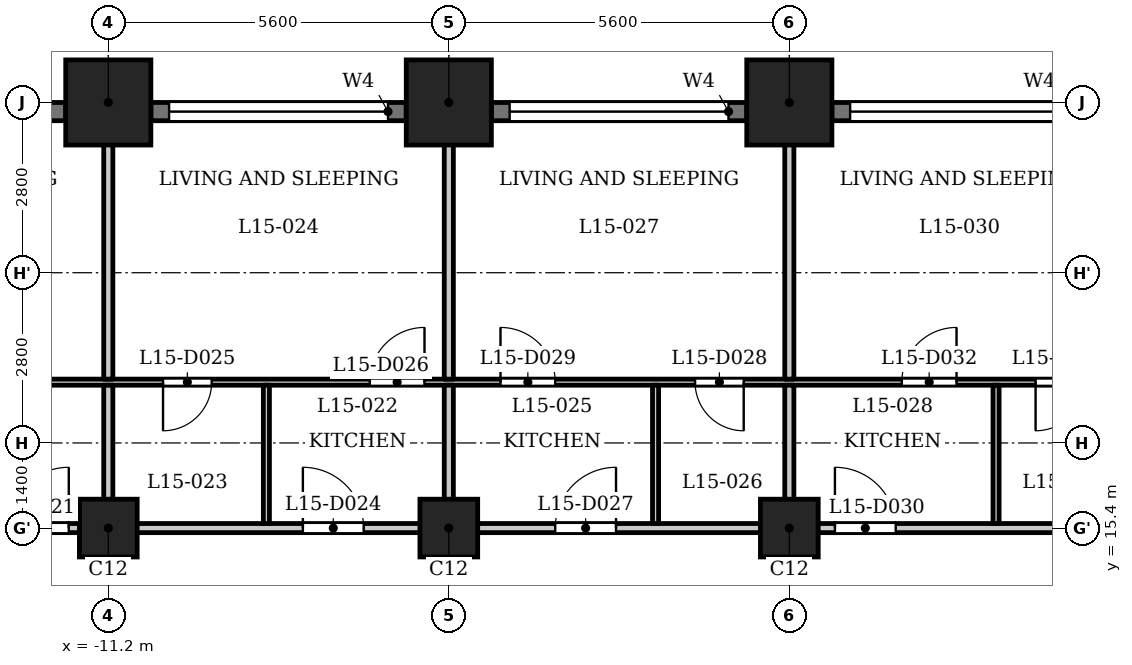
"""IFC4 building model, lengths in metres.
Left out: names, types, materials, properties, quantities, classifications, styles, units other than length and angle.
Written with IfcOpenShell. Run it as: python <this file> out.ifc"""

import sys

from ifc_helpers import new_model, si_unit, direction, frame, frame_2d, origin, origin_2d, place, context, subcontext, project, spatial, rectangle, extrude, element, fill, save


model = new_model("IFC4")
c1 = context("Model", 3, precision=1e-05, world=origin(), true_north=direction((0.0, 1.0)))
c2 = subcontext(c1, "Body", "Model", "MODEL_VIEW")
j1 = project(units=[si_unit("LENGTHUNIT", "METRE"), si_unit("PLANEANGLEUNIT", "RADIAN")], contexts=[c1])
p1 = place(None, origin())
s1 = spatial("IfcSite", under=j1, at=p1, CompositionType="ELEMENT")
p2 = place(p1, origin())
s2 = spatial("IfcBuilding", under=s1, at=p2, CompositionType="ELEMENT")
p3 = place(p2, frame((0.0, 0.0, 62.0)))
s3 = spatial("IfcBuildingStorey", under=s2, at=p3, CompositionType="ELEMENT", Elevation=62.0)
for number, where, z_axis, x_axis in (
    (1, (0.0, 22.4, 0.0), (0.0, 0.0, 1.0), (1.0, 0.0, 0.0)),
    (2, (-5.6, 22.4, 0.0), (0.0, 0.0, 1.0), (1.0, 0.0, 0.0)),
    (3, (-11.2, 22.4, 0.0), (0.0, 0.0, 1.0), (1.0, 0.0, 0.0)),
):
    element("IfcColumn", number, at=place(p3, frame(where, z_axis=z_axis, x_axis=x_axis)), inside=s3, PredefinedType="COLUMN", context=c2, shape_type="SweptSolid", body=[
        extrude(rectangle(XDim=1.4, YDim=1.4, at=origin_2d()), origin(), (0.0, 0.0, 1.0), 3.5),
    ])
for number, where, z_axis, x_axis in (
    (4, (-11.2, 15.4, 0.0), (0.0, 0.0, 1.0), (1.0, 0.0, 0.0)),
    (5, (-5.6, 15.4, 0.0), (0.0, 0.0, 1.0), (1.0, 0.0, 0.0)),
    (6, (0.0, 15.4, 0.0), (0.0, 0.0, 1.0), (1.0, 0.0, 0.0)),
):
    element("IfcColumn", number, at=place(p3, frame(where, z_axis=z_axis, x_axis=x_axis)), inside=s3, PredefinedType="COLUMN", context=c2, shape_type="SweptSolid", body=[
        extrude(rectangle(XDim=0.95, YDim=0.95, at=origin_2d()), origin(), (0.0, 0.0, 1.0), 3.5),
    ])
p4 = place(p3, frame((4.9, 22.25, 0.0), z_axis=(0.0, 0.0, 1.0), x_axis=(-1.0, 0.0, 0.0)))
e7 = element("IfcWall", 7, at=p4, inside=s3, PredefinedType="SOLIDWALL", context=c2, shape_type="SweptSolid", body=[
    extrude(rectangle(XDim=4.2, YDim=0.3, at=frame_2d((2.1, 0.0))), origin(), (0.0, 0.0, 1.0), 2.35),
])
p5 = place(p4, frame((0.3, 0.0, 1.2)))
e8 = element("IfcOpeningElement", 8, at=p5, cuts=e7, PredefinedType="OPENING", context=c2, shape_type="SweptSolid", body=[
    extrude(rectangle(XDim=3.6, YDim=0.95, at=frame_2d((1.8, 0.475))), frame((0.0, 0.16, 0.0), z_axis=(0.0, -1.0, 0.0), x_axis=(1.0, 0.0, 0.0)), (0.0, 0.0, 1.0), 0.32),
])
p6 = place(p3, frame((-0.7, 22.25, 0.0), z_axis=(0.0, 0.0, 1.0), x_axis=(-1.0, 0.0, 0.0)))
e9 = element("IfcWall", 9, at=p6, inside=s3, PredefinedType="SOLIDWALL", context=c2, shape_type="SweptSolid", body=[
    extrude(rectangle(XDim=4.2, YDim=0.3, at=frame_2d((2.1, 0.0))), origin(), (0.0, 0.0, 1.0), 2.35),
])
p7 = place(p6, frame((0.3, 0.0, 1.2)))
e10 = element("IfcOpeningElement", 10, at=p7, cuts=e9, PredefinedType="OPENING", context=c2, shape_type="SweptSolid", body=[
    extrude(rectangle(XDim=3.6, YDim=0.95, at=frame_2d((1.8, 0.475))), frame((0.0, 0.16, 0.0), z_axis=(0.0, -1.0, 0.0), x_axis=(1.0, 0.0, 0.0)), (0.0, 0.0, 1.0), 0.32),
])
p8 = place(p3, frame((-6.3, 22.25, 0.0), z_axis=(0.0, 0.0, 1.0), x_axis=(-1.0, 0.0, 0.0)))
e11 = element("IfcWall", 11, at=p8, inside=s3, PredefinedType="SOLIDWALL", context=c2, shape_type="SweptSolid", body=[
    extrude(rectangle(XDim=4.2, YDim=0.3, at=frame_2d((2.1, 0.0))), origin(), (0.0, 0.0, 1.0), 2.35),
])
p9 = place(p8, frame((0.3, 0.0, 1.2)))
e12 = element("IfcOpeningElement", 12, at=p9, cuts=e11, PredefinedType="OPENING", context=c2, shape_type="SweptSolid", body=[
    extrude(rectangle(XDim=3.6, YDim=0.95, at=frame_2d((1.8, 0.475))), frame((0.0, 0.16, 0.0), z_axis=(0.0, -1.0, 0.0), x_axis=(1.0, 0.0, 0.0)), (0.0, 0.0, 1.0), 0.32),
])
p10 = place(p3, frame((-11.9, 22.25, 0.0), z_axis=(0.0, 0.0, 1.0), x_axis=(-1.0, 0.0, 0.0)))
e13 = element("IfcWall", 13, at=p10, inside=s3, PredefinedType="SOLIDWALL", context=c2, shape_type="SweptSolid", body=[
    extrude(rectangle(XDim=4.2, YDim=0.3, at=frame_2d((2.1, 0.0))), origin(), (0.0, 0.0, 1.0), 2.35),
])
p11 = place(p10, frame((0.3, 0.0, 1.2)))
e14 = element("IfcOpeningElement", 14, at=p11, cuts=e13, PredefinedType="OPENING", context=c2, shape_type="SweptSolid", body=[
    extrude(rectangle(XDim=3.6, YDim=0.95, at=frame_2d((1.8, 0.475))), frame((0.0, 0.16, 0.0), z_axis=(0.0, -1.0, 0.0), x_axis=(1.0, 0.0, 0.0)), (0.0, 0.0, 1.0), 0.32),
])
p12 = place(p3, frame((-27.484, 15.4, 0.0), z_axis=(0.0, 0.0, 1.0), x_axis=(1.0, 0.0, 0.0)))
e15 = element("IfcWall", 15, at=p12, inside=s3, PredefinedType="PARTITIONING", context=c2, shape_type="SweptSolid", body=[
    extrude(rectangle(XDim=54.968, YDim=0.15, at=frame_2d((27.484, 0.0))), origin(), (0.0, 0.0, 1.0), 3.2),
])
p13 = place(p12, frame((8.784, 0.0, 0.0)))
e16 = element("IfcOpeningElement", 16, at=p13, cuts=e15, PredefinedType="OPENING", context=c2, shape_type="SweptSolid", body=[
    extrude(rectangle(XDim=1.0, YDim=2.1, at=frame_2d((0.5, 1.05))), frame((0.0, 0.085, 0.0), z_axis=(0.0, -1.0, 0.0), x_axis=(1.0, 0.0, 0.0)), (0.0, 0.0, 1.0), 0.17),
])
p14 = place(p12, frame((14.634, 0.0, 0.0)))
e17 = element("IfcOpeningElement", 17, at=p14, cuts=e15, PredefinedType="OPENING", context=c2, shape_type="SweptSolid", body=[
    extrude(rectangle(XDim=1.0, YDim=2.1, at=frame_2d((0.5, 1.05))), frame((0.0, 0.085, 0.0), z_axis=(0.0, -1.0, 0.0), x_axis=(1.0, 0.0, 0.0)), (0.0, 0.0, 1.0), 0.17),
])
p15 = place(p12, frame((19.484, 0.0, 0.0)))
e18 = element("IfcOpeningElement", 18, at=p15, cuts=e15, PredefinedType="OPENING", context=c2, shape_type="SweptSolid", body=[
    extrude(rectangle(XDim=1.0, YDim=2.1, at=frame_2d((0.5, 1.05))), frame((0.0, 0.085, 0.0), z_axis=(0.0, -1.0, 0.0), x_axis=(1.0, 0.0, 0.0)), (0.0, 0.0, 1.0), 0.17),
])
p16 = place(p12, frame((23.634, 0.0, 0.0)))
e19 = element("IfcOpeningElement", 19, at=p16, cuts=e15, PredefinedType="OPENING", context=c2, shape_type="SweptSolid", body=[
    extrude(rectangle(XDim=1.0, YDim=2.1, at=frame_2d((0.5, 1.05))), frame((0.0, 0.085, 0.0), z_axis=(0.0, -1.0, 0.0), x_axis=(1.0, 0.0, 0.0)), (0.0, 0.0, 1.0), 0.17),
])
p17 = place(p12, frame((28.234, 0.0, 0.0)))
e20 = element("IfcOpeningElement", 20, at=p17, cuts=e15, PredefinedType="OPENING", context=c2, shape_type="SweptSolid", body=[
    extrude(rectangle(XDim=1.0, YDim=2.1, at=frame_2d((0.5, 1.05))), frame((0.0, 0.085, 0.0), z_axis=(0.0, -1.0, 0.0), x_axis=(1.0, 0.0, 0.0)), (0.0, 0.0, 1.0), 0.17),
])
p18 = place(p12, frame((33.784, 0.0, 0.0)))
e21 = element("IfcOpeningElement", 21, at=p18, cuts=e15, PredefinedType="OPENING", context=c2, shape_type="SweptSolid", body=[
    extrude(rectangle(XDim=1.0, YDim=2.1, at=frame_2d((0.5, 1.05))), frame((0.0, 0.085, 0.0), z_axis=(0.0, -1.0, 0.0), x_axis=(1.0, 0.0, 0.0)), (0.0, 0.0, 1.0), 0.17),
])
p19 = place(p12, frame((39.534, 0.0, 0.0)))
e22 = element("IfcOpeningElement", 22, at=p19, cuts=e15, PredefinedType="OPENING", context=c2, shape_type="SweptSolid", body=[
    extrude(rectangle(XDim=1.0, YDim=2.1, at=frame_2d((0.5, 1.05))), frame((0.0, 0.085, 0.0), z_axis=(0.0, -1.0, 0.0), x_axis=(1.0, 0.0, 0.0)), (0.0, 0.0, 1.0), 0.17),
])
p20 = place(p12, frame((48.234, 0.0, 0.0)))
e23 = element("IfcOpeningElement", 23, at=p20, cuts=e15, PredefinedType="OPENING", context=c2, shape_type="SweptSolid", body=[
    extrude(rectangle(XDim=1.0, YDim=2.1, at=frame_2d((0.5, 1.05))), frame((0.0, 0.085, 0.0), z_axis=(0.0, -1.0, 0.0), x_axis=(1.0, 0.0, 0.0)), (0.0, 0.0, 1.0), 0.17),
])
p21 = place(p3, frame((-26.64, 17.8, 0.0), z_axis=(0.0, 0.0, 1.0), x_axis=(1.0, 0.0, 0.0)))
e24 = element("IfcWall", 24, at=p21, inside=s3, PredefinedType="PARTITIONING", context=c2, shape_type="SweptSolid", body=[
    extrude(rectangle(XDim=53.034, YDim=0.1, at=frame_2d((26.517, 0.0))), origin(), (0.0, 0.0, 1.0), 3.2),
])
p22 = place(p21, frame((2.872, 0.0, 0.0)))
e25 = element("IfcOpeningElement", 25, at=p22, cuts=e24, PredefinedType="OPENING", context=c2, shape_type="SweptSolid", body=[
    extrude(rectangle(XDim=0.8, YDim=2.1, at=frame_2d((0.4, 1.05))), frame((0.0, 0.06, 0.0), z_axis=(0.0, -1.0, 0.0), x_axis=(1.0, 0.0, 0.0)), (0.0, 0.0, 1.0), 0.12),
])
p23 = place(p21, frame((7.04, 0.0, 0.0)))
e26 = element("IfcOpeningElement", 26, at=p23, cuts=e24, PredefinedType="OPENING", context=c2, shape_type="SweptSolid", body=[
    extrude(rectangle(XDim=0.9, YDim=2.1, at=frame_2d((0.45, 1.05))), frame((0.0, 0.06, 0.0), z_axis=(0.0, -1.0, 0.0), x_axis=(1.0, 0.0, 0.0)), (0.0, 0.0, 1.0), 0.12),
])
p24 = place(p21, frame((10.74, 0.0, 0.0)))
e27 = element("IfcOpeningElement", 27, at=p24, cuts=e24, PredefinedType="OPENING", context=c2, shape_type="SweptSolid", body=[
    extrude(rectangle(XDim=0.8, YDim=2.1, at=frame_2d((0.4, 1.05))), frame((0.0, 0.06, 0.0), z_axis=(0.0, -1.0, 0.0), x_axis=(1.0, 0.0, 0.0)), (0.0, 0.0, 1.0), 0.12),
])
p25 = place(p21, frame((12.89, 0.0, 0.0)))
e28 = element("IfcOpeningElement", 28, at=p25, cuts=e24, PredefinedType="OPENING", context=c2, shape_type="SweptSolid", body=[
    extrude(rectangle(XDim=0.9, YDim=2.1, at=frame_2d((0.45, 1.05))), frame((0.0, 0.06, 0.0), z_axis=(0.0, -1.0, 0.0), x_axis=(1.0, 0.0, 0.0)), (0.0, 0.0, 1.0), 0.12),
])
p26 = place(p21, frame((16.34, 0.0, 0.0)))
e29 = element("IfcOpeningElement", 29, at=p26, cuts=e24, PredefinedType="OPENING", context=c2, shape_type="SweptSolid", body=[
    extrude(rectangle(XDim=0.8, YDim=2.1, at=frame_2d((0.4, 1.05))), frame((0.0, 0.06, 0.0), z_axis=(0.0, -1.0, 0.0), x_axis=(1.0, 0.0, 0.0)), (0.0, 0.0, 1.0), 0.12),
])
p27 = place(p21, frame((19.74, 0.0, 0.0)))
e30 = element("IfcOpeningElement", 30, at=p27, cuts=e24, PredefinedType="OPENING", context=c2, shape_type="SweptSolid", body=[
    extrude(rectangle(XDim=0.9, YDim=2.1, at=frame_2d((0.45, 1.05))), frame((0.0, 0.06, 0.0), z_axis=(0.0, -1.0, 0.0), x_axis=(1.0, 0.0, 0.0)), (0.0, 0.0, 1.0), 0.12),
])
p28 = place(p21, frame((25.09, 0.0, 0.0)))
e31 = element("IfcOpeningElement", 31, at=p28, cuts=e24, PredefinedType="OPENING", context=c2, shape_type="SweptSolid", body=[
    extrude(rectangle(XDim=0.8, YDim=2.1, at=frame_2d((0.4, 1.05))), frame((0.0, 0.06, 0.0), z_axis=(0.0, -1.0, 0.0), x_axis=(1.0, 0.0, 0.0)), (0.0, 0.0, 1.0), 0.12),
])
p29 = place(p21, frame((21.89, 0.0, 0.0)))
e32 = element("IfcOpeningElement", 32, at=p29, cuts=e24, PredefinedType="OPENING", context=c2, shape_type="SweptSolid", body=[
    extrude(rectangle(XDim=0.9, YDim=2.1, at=frame_2d((0.45, 1.05))), frame((0.0, 0.06, 0.0), z_axis=(0.0, -1.0, 0.0), x_axis=(1.0, 0.0, 0.0)), (0.0, 0.0, 1.0), 0.12),
])
p30 = place(p21, frame((30.69, 0.0, 0.0)))
e33 = element("IfcOpeningElement", 33, at=p30, cuts=e24, PredefinedType="OPENING", context=c2, shape_type="SweptSolid", body=[
    extrude(rectangle(XDim=0.8, YDim=2.1, at=frame_2d((0.4, 1.05))), frame((0.0, 0.06, 0.0), z_axis=(0.0, -1.0, 0.0), x_axis=(1.0, 0.0, 0.0)), (0.0, 0.0, 1.0), 0.12),
])
p31 = place(p21, frame((28.49, 0.0, 0.0)))
e34 = element("IfcOpeningElement", 34, at=p31, cuts=e24, PredefinedType="OPENING", context=c2, shape_type="SweptSolid", body=[
    extrude(rectangle(XDim=0.9, YDim=2.1, at=frame_2d((0.45, 1.05))), frame((0.0, 0.06, 0.0), z_axis=(0.0, -1.0, 0.0), x_axis=(1.0, 0.0, 0.0)), (0.0, 0.0, 1.0), 0.12),
])
p32 = place(p21, frame((36.49, 0.0, 0.0)))
e35 = element("IfcOpeningElement", 35, at=p32, cuts=e24, PredefinedType="OPENING", context=c2, shape_type="SweptSolid", body=[
    extrude(rectangle(XDim=0.8, YDim=2.1, at=frame_2d((0.4, 1.05))), frame((0.0, 0.06, 0.0), z_axis=(0.0, -1.0, 0.0), x_axis=(1.0, 0.0, 0.0)), (0.0, 0.0, 1.0), 0.12),
])
p33 = place(p21, frame((33.04, 0.0, 0.0)))
e36 = element("IfcOpeningElement", 36, at=p33, cuts=e24, PredefinedType="OPENING", context=c2, shape_type="SweptSolid", body=[
    extrude(rectangle(XDim=0.9, YDim=2.1, at=frame_2d((0.45, 1.05))), frame((0.0, 0.06, 0.0), z_axis=(0.0, -1.0, 0.0), x_axis=(1.0, 0.0, 0.0)), (0.0, 0.0, 1.0), 0.12),
])
p34 = place(p21, frame((41.49, 0.0, 0.0)))
e37 = element("IfcOpeningElement", 37, at=p34, cuts=e24, PredefinedType="OPENING", context=c2, shape_type="SweptSolid", body=[
    extrude(rectangle(XDim=0.8, YDim=2.1, at=frame_2d((0.4, 1.05))), frame((0.0, 0.06, 0.0), z_axis=(0.0, -1.0, 0.0), x_axis=(1.0, 0.0, 0.0)), (0.0, 0.0, 1.0), 0.12),
])
p35 = place(p21, frame((39.79, 0.0, 0.0)))
e38 = element("IfcOpeningElement", 38, at=p35, cuts=e24, PredefinedType="OPENING", context=c2, shape_type="SweptSolid", body=[
    extrude(rectangle(XDim=0.9, YDim=2.1, at=frame_2d((0.45, 1.05))), frame((0.0, 0.06, 0.0), z_axis=(0.0, -1.0, 0.0), x_axis=(1.0, 0.0, 0.0)), (0.0, 0.0, 1.0), 0.12),
])
p36 = place(p21, frame((51.44, 0.0, 0.0)))
e39 = element("IfcOpeningElement", 39, at=p36, cuts=e24, PredefinedType="OPENING", context=c2, shape_type="SweptSolid", body=[
    extrude(rectangle(XDim=0.8, YDim=2.1, at=frame_2d((0.4, 1.05))), frame((0.0, 0.06, 0.0), z_axis=(0.0, -1.0, 0.0), x_axis=(1.0, 0.0, 0.0)), (0.0, 0.0, 1.0), 0.12),
])
p37 = place(p21, frame((46.49, 0.0, 0.0)))
e40 = element("IfcOpeningElement", 40, at=p37, cuts=e24, PredefinedType="OPENING", context=c2, shape_type="SweptSolid", body=[
    extrude(rectangle(XDim=0.9, YDim=2.1, at=frame_2d((0.45, 1.05))), frame((0.0, 0.06, 0.0), z_axis=(0.0, -1.0, 0.0), x_axis=(1.0, 0.0, 0.0)), (0.0, 0.0, 1.0), 0.12),
])
p38 = place(p3, frame((-11.2, 15.475, 0.0), z_axis=(0.0, 0.0, 1.0), x_axis=(0.0, 1.0, 0.0)))
e41 = element("IfcWall", 41, at=p38, inside=s3, PredefinedType="PARTITIONING", context=c2, shape_type="SweptSolid", body=[
    extrude(rectangle(XDim=2.275, YDim=0.15, at=frame_2d((1.137, 0.0))), origin(), (0.0, 0.0, 1.0), 3.2),
])
p39 = place(p3, frame((-11.2, 17.85, 0.0), z_axis=(0.0, 0.0, 1.0), x_axis=(0.0, 1.0, 0.0)))
e42 = element("IfcWall", 42, at=p39, inside=s3, PredefinedType="PARTITIONING", context=c2, shape_type="SweptSolid", body=[
    extrude(rectangle(XDim=5.23, YDim=0.15, at=frame_2d((2.615, 0.0))), origin(), (0.0, 0.0, 1.0), 3.2),
])
p40 = place(p3, frame((-8.6, 15.475, 0.0), z_axis=(0.0, 0.0, 1.0), x_axis=(0.0, 1.0, 0.0)))
e43 = element("IfcWall", 43, at=p40, inside=s3, PredefinedType="PARTITIONING", context=c2, shape_type="SweptSolid", body=[
    extrude(rectangle(XDim=2.275, YDim=0.1, at=frame_2d((1.137, 0.0))), origin(), (0.0, 0.0, 1.0), 3.2),
])
p41 = place(p3, frame((-5.6, 15.475, 0.0), z_axis=(0.0, 0.0, 1.0), x_axis=(0.0, 1.0, 0.0)))
e44 = element("IfcWall", 44, at=p41, inside=s3, PredefinedType="PARTITIONING", context=c2, shape_type="SweptSolid", body=[
    extrude(rectangle(XDim=2.275, YDim=0.15, at=frame_2d((1.137, 0.0))), origin(), (0.0, 0.0, 1.0), 3.2),
])
p42 = place(p3, frame((-5.6, 17.85, 0.0), z_axis=(0.0, 0.0, 1.0), x_axis=(0.0, 1.0, 0.0)))
e45 = element("IfcWall", 45, at=p42, inside=s3, PredefinedType="PARTITIONING", context=c2, shape_type="SweptSolid", body=[
    extrude(rectangle(XDim=5.23, YDim=0.15, at=frame_2d((2.615, 0.0))), origin(), (0.0, 0.0, 1.0), 3.2),
])
p43 = place(p3, frame((-2.2, 15.475, 0.0), z_axis=(0.0, 0.0, 1.0), x_axis=(0.0, 1.0, 0.0)))
e46 = element("IfcWall", 46, at=p43, inside=s3, PredefinedType="PARTITIONING", context=c2, shape_type="SweptSolid", body=[
    extrude(rectangle(XDim=2.275, YDim=0.1, at=frame_2d((1.137, 0.0))), origin(), (0.0, 0.0, 1.0), 3.2),
])
p44 = place(p3, frame((0.0, 15.475, 0.0), z_axis=(0.0, 0.0, 1.0), x_axis=(0.0, 1.0, 0.0)))
e47 = element("IfcWall", 47, at=p44, inside=s3, PredefinedType="PARTITIONING", context=c2, shape_type="SweptSolid", body=[
    extrude(rectangle(XDim=2.275, YDim=0.15, at=frame_2d((1.137, 0.0))), origin(), (0.0, 0.0, 1.0), 3.2),
])
p45 = place(p3, frame((0.0, 17.85, 0.0), z_axis=(0.0, 0.0, 1.0), x_axis=(0.0, 1.0, 0.0)))
e48 = element("IfcWall", 48, at=p45, inside=s3, PredefinedType="PARTITIONING", context=c2, shape_type="SweptSolid", body=[
    extrude(rectangle(XDim=5.23, YDim=0.15, at=frame_2d((2.615, 0.0))), origin(), (0.0, 0.0, 1.0), 3.2),
])
p46 = place(p3, frame((3.4, 15.475, 0.0), z_axis=(0.0, 0.0, 1.0), x_axis=(0.0, 1.0, 0.0)))
e49 = element("IfcWall", 49, at=p46, inside=s3, PredefinedType="PARTITIONING", context=c2, shape_type="SweptSolid", body=[
    extrude(rectangle(XDim=2.275, YDim=0.1, at=frame_2d((1.137, 0.0))), origin(), (0.0, 0.0, 1.0), 3.2),
])
p47 = place(p14, origin())
e50 = element("IfcDoor", 50, at=p47, inside=s3, OperationType="SINGLE_SWING_LEFT", PredefinedType="DOOR", context=c2, shape_type="SweptSolid", body=[
    extrude(rectangle(XDim=1.0, YDim=2.1, at=frame_2d((0.5, 1.05))), frame((0.0, 0.025, 0.0), z_axis=(0.0, -1.0, 0.0), x_axis=(1.0, 0.0, 0.0)), (0.0, 0.0, 1.0), 0.05),
])
fill(e17, e50)
p48 = place(p15, origin())
e51 = element("IfcDoor", 51, at=p48, inside=s3, OperationType="SINGLE_SWING_RIGHT", PredefinedType="DOOR", context=c2, shape_type="SweptSolid", body=[
    extrude(rectangle(XDim=1.0, YDim=2.1, at=frame_2d((0.5, 1.05))), frame((0.0, 0.025, 0.0), z_axis=(0.0, -1.0, 0.0), x_axis=(1.0, 0.0, 0.0)), (0.0, 0.0, 1.0), 0.05),
])
fill(e18, e51)
p49 = place(p26, origin())
e52 = element("IfcDoor", 52, at=p49, inside=s3, OperationType="SINGLE_SWING_LEFT", PredefinedType="DOOR", context=c2, shape_type="SweptSolid", body=[
    extrude(rectangle(XDim=0.8, YDim=2.1, at=frame_2d((0.4, 1.05))), frame((0.0, 0.025, 0.0), z_axis=(0.0, -1.0, 0.0), x_axis=(1.0, 0.0, 0.0)), (0.0, 0.0, 1.0), 0.05),
])
fill(e29, e52)
p50 = place(p27, origin())
e53 = element("IfcDoor", 53, at=p50, inside=s3, OperationType="SINGLE_SWING_LEFT", PredefinedType="DOOR", context=c2, shape_type="SweptSolid", body=[
    extrude(rectangle(XDim=0.9, YDim=2.1, at=frame_2d((0.45, 1.05))), frame((0.0, 0.025, 0.0), z_axis=(0.0, -1.0, 0.0), x_axis=(1.0, 0.0, 0.0)), (0.0, 0.0, 1.0), 0.05),
])
fill(e30, e53)
p51 = place(p16, origin())
e54 = element("IfcDoor", 54, at=p51, inside=s3, OperationType="SINGLE_SWING_LEFT", PredefinedType="DOOR", context=c2, shape_type="SweptSolid", body=[
    extrude(rectangle(XDim=1.0, YDim=2.1, at=frame_2d((0.5, 1.05))), frame((0.0, 0.025, 0.0), z_axis=(0.0, -1.0, 0.0), x_axis=(1.0, 0.0, 0.0)), (0.0, 0.0, 1.0), 0.05),
])
fill(e19, e54)
p52 = place(p28, origin())
e55 = element("IfcDoor", 55, at=p52, inside=s3, OperationType="SINGLE_SWING_RIGHT", PredefinedType="DOOR", context=c2, shape_type="SweptSolid", body=[
    extrude(rectangle(XDim=0.8, YDim=2.1, at=frame_2d((0.4, 1.05))), frame((0.0, 0.025, 0.0), z_axis=(0.0, -1.0, 0.0), x_axis=(1.0, 0.0, 0.0)), (0.0, 0.0, 1.0), 0.05),
])
fill(e31, e55)
p53 = place(p29, origin())
e56 = element("IfcDoor", 56, at=p53, inside=s3, OperationType="SINGLE_SWING_RIGHT", PredefinedType="DOOR", context=c2, shape_type="SweptSolid", body=[
    extrude(rectangle(XDim=0.9, YDim=2.1, at=frame_2d((0.45, 1.05))), frame((0.0, 0.025, 0.0), z_axis=(0.0, -1.0, 0.0), x_axis=(1.0, 0.0, 0.0)), (0.0, 0.0, 1.0), 0.05),
])
fill(e32, e56)
p54 = place(p17, origin())
e57 = element("IfcDoor", 57, at=p54, inside=s3, OperationType="SINGLE_SWING_RIGHT", PredefinedType="DOOR", context=c2, shape_type="SweptSolid", body=[
    extrude(rectangle(XDim=1.0, YDim=2.1, at=frame_2d((0.5, 1.05))), frame((0.0, 0.025, 0.0), z_axis=(0.0, -1.0, 0.0), x_axis=(1.0, 0.0, 0.0)), (0.0, 0.0, 1.0), 0.05),
])
fill(e20, e57)
p55 = place(p30, origin())
e58 = element("IfcDoor", 58, at=p55, inside=s3, OperationType="SINGLE_SWING_LEFT", PredefinedType="DOOR", context=c2, shape_type="SweptSolid", body=[
    extrude(rectangle(XDim=0.8, YDim=2.1, at=frame_2d((0.4, 1.05))), frame((0.0, 0.025, 0.0), z_axis=(0.0, -1.0, 0.0), x_axis=(1.0, 0.0, 0.0)), (0.0, 0.0, 1.0), 0.05),
])
fill(e33, e58)
p56 = place(p31, origin())
e59 = element("IfcDoor", 59, at=p56, inside=s3, OperationType="SINGLE_SWING_LEFT", PredefinedType="DOOR", context=c2, shape_type="SweptSolid", body=[
    extrude(rectangle(XDim=0.9, YDim=2.1, at=frame_2d((0.45, 1.05))), frame((0.0, 0.025, 0.0), z_axis=(0.0, -1.0, 0.0), x_axis=(1.0, 0.0, 0.0)), (0.0, 0.0, 1.0), 0.05),
])
fill(e34, e59)
p57 = place(p5, origin())
e60 = element("IfcWindow", 60, at=p57, inside=s3, PartitioningType="SINGLE_PANEL", PredefinedType="WINDOW", context=c2, shape_type="SweptSolid", body=[
    extrude(rectangle(XDim=3.6, YDim=0.95, at=frame_2d((1.8, 0.475))), frame((0.0, 0.03, 0.0), z_axis=(0.0, -1.0, 0.0), x_axis=(1.0, 0.0, 0.0)), (0.0, 0.0, 1.0), 0.06),
])
fill(e8, e60)
p58 = place(p7, origin())
e61 = element("IfcWindow", 61, at=p58, inside=s3, PartitioningType="SINGLE_PANEL", PredefinedType="WINDOW", context=c2, shape_type="SweptSolid", body=[
    extrude(rectangle(XDim=3.6, YDim=0.95, at=frame_2d((1.8, 0.475))), frame((0.0, 0.03, 0.0), z_axis=(0.0, -1.0, 0.0), x_axis=(1.0, 0.0, 0.0)), (0.0, 0.0, 1.0), 0.06),
])
fill(e10, e61)
p59 = place(p9, origin())
e62 = element("IfcWindow", 62, at=p59, inside=s3, PartitioningType="SINGLE_PANEL", PredefinedType="WINDOW", context=c2, shape_type="SweptSolid", body=[
    extrude(rectangle(XDim=3.6, YDim=0.95, at=frame_2d((1.8, 0.475))), frame((0.0, 0.03, 0.0), z_axis=(0.0, -1.0, 0.0), x_axis=(1.0, 0.0, 0.0)), (0.0, 0.0, 1.0), 0.06),
])
fill(e12, e62)
save(model, sys.argv[1])
